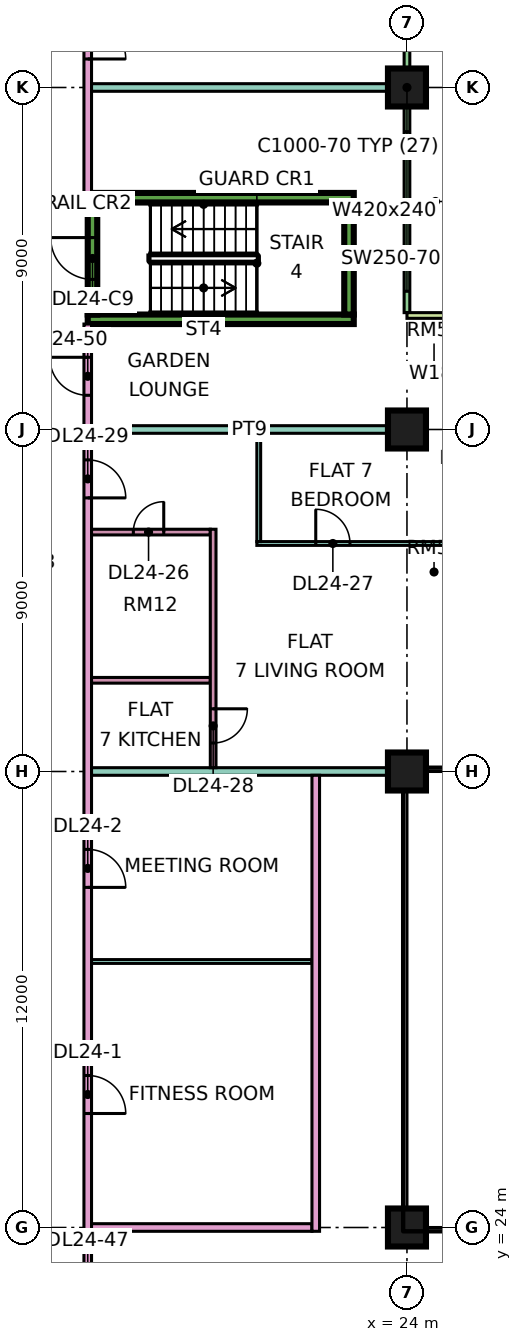
"""IFC4 building model, lengths in metres.
Left out: names, types, materials, properties, quantities, classifications, styles, units other than length and angle.
Written with IfcOpenShell. Run it as: python <this file> out.ifc"""

import sys

from ifc_helpers import new_model, si_unit, direction, frame, frame_2d, origin, origin_2d, place, context, subcontext, project, spatial, rectangle, extrude, element, fill, save


model = new_model("IFC4")
c1 = context("Model", 3, precision=1e-05, world=origin(), true_north=direction((0.0, 1.0)))
c2 = subcontext(c1, "Body", "Model", "MODEL_VIEW")
j1 = project(units=[si_unit("LENGTHUNIT", "METRE"), si_unit("PLANEANGLEUNIT", "RADIAN")], contexts=[c1])
p1 = place(None, origin())
s1 = spatial("IfcSite", under=j1, at=p1, CompositionType="ELEMENT")
p2 = place(p1, origin())
s2 = spatial("IfcBuilding", under=s1, at=p2, CompositionType="ELEMENT")
p3 = place(p2, frame((0.0, 0.0, 106.9)))
s3 = spatial("IfcBuildingStorey", under=s2, at=p3, CompositionType="ELEMENT", Elevation=106.9)
for number, where, z_axis, x_axis in (
    (1, (24.0, 24.0, 0.0), (0.0, 0.0, 1.0), (1.0, 0.0, 0.0)),
    (2, (24.0, 36.0, 0.0), (0.0, 0.0, 1.0), (1.0, 0.0, 0.0)),
    (3, (24.0, 45.0, 0.0), (0.0, 0.0, 1.0), (1.0, 0.0, 0.0)),
    (4, (24.0, 54.0, 0.0), (0.0, 0.0, 1.0), (1.0, 0.0, 0.0)),
):
    element("IfcColumn", number, at=place(p3, frame(where, z_axis=z_axis, x_axis=x_axis)), inside=s3, PredefinedType="COLUMN", context=c2, shape_type="SweptSolid", body=[
        extrude(rectangle(XDim=1.0, YDim=1.0, at=origin_2d()), origin(), (0.0, 0.0, 1.0), 3.75),
    ])
for number, where, z_axis, x_axis in (
    (5, (15.6, 47.9, 0.0), (0.0, 0.0, 1.0), (1.0, 0.0, 0.0)),
    (6, (15.6, 51.1, 0.0), (0.0, 0.0, 1.0), (1.0, 0.0, 0.0)),
):
    element("IfcWall", number, at=place(p3, frame(where, z_axis=z_axis, x_axis=x_axis)), inside=s3, PredefinedType="SHEAR", context=c2, shape_type="SweptSolid", body=[
        extrude(rectangle(XDim=7.0, YDim=0.25, at=frame_2d((3.5, 0.0))), origin(), (0.0, 0.0, 1.0), 3.75),
    ])
p4 = place(p3, frame((15.725, 48.025, 0.0), z_axis=(0.0, 0.0, 1.0), x_axis=(0.0, 1.0, 0.0)))
e7 = element("IfcWall", 7, at=p4, inside=s3, PredefinedType="SHEAR", context=c2, shape_type="SweptSolid", body=[
    extrude(rectangle(XDim=2.95, YDim=0.25, at=frame_2d((1.475, 0.0))), origin(), (0.0, 0.0, 1.0), 3.75),
])
p5 = place(p4, frame((0.925, 0.0, 0.0)))
e8 = element("IfcOpeningElement", 8, at=p5, cuts=e7, PredefinedType="OPENING", context=c2, shape_type="SweptSolid", body=[
    extrude(rectangle(XDim=1.1, YDim=2.2, at=frame_2d((0.55, 1.1))), frame((0.0, 0.135, 0.0), z_axis=(0.0, -1.0, 0.0), x_axis=(1.0, 0.0, 0.0)), (0.0, 0.0, 1.0), 0.27),
])
p6 = place(p3, frame((22.475, 48.025, 0.0), z_axis=(0.0, 0.0, 1.0), x_axis=(0.0, 1.0, 0.0)))
e9 = element("IfcWall", 9, at=p6, inside=s3, PredefinedType="SHEAR", context=c2, shape_type="SweptSolid", body=[
    extrude(rectangle(XDim=2.95, YDim=0.25, at=frame_2d((1.475, 0.0))), origin(), (0.0, 0.0, 1.0), 3.75),
])
p7 = place(p3, frame((24.0, 48.075, 0.0), z_axis=(0.0, 0.0, 1.0), x_axis=(0.0, 1.0, 0.0)))
e10 = element("IfcWall", 10, at=p7, inside=s3, PredefinedType="SOLIDWALL", context=c2, shape_type="SweptSolid", body=[
    extrude(rectangle(XDim=13.35, YDim=0.15, at=frame_2d((6.675, 0.0))), origin(), (0.0, 0.0, 1.0), 3.35),
])
p8 = place(p7, frame((0.562, 0.0, 0.45)))
e11 = element("IfcOpeningElement", 11, at=p8, cuts=e10, PredefinedType="OPENING", context=c2, shape_type="SweptSolid", body=[
    extrude(rectangle(XDim=4.2, YDim=2.4, at=frame_2d((2.1, 1.2))), frame((0.0, 0.085, 0.0), z_axis=(0.0, -1.0, 0.0), x_axis=(1.0, 0.0, 0.0)), (0.0, 0.0, 1.0), 0.17),
])
p9 = place(p7, frame((8.325, 0.0, 0.0)))
e12 = element("IfcOpeningElement", 12, at=p9, cuts=e10, PredefinedType="OPENING", context=c2, shape_type="SweptSolid", body=[
    extrude(rectangle(XDim=1.8, YDim=2.4, at=frame_2d((0.9, 1.2))), frame((0.0, 0.085, 0.0), z_axis=(0.0, -1.0, 0.0), x_axis=(1.0, 0.0, 0.0)), (0.0, 0.0, 1.0), 0.17),
])
p10 = place(p7, frame((12.188, 0.0, 0.45)))
e13 = element("IfcOpeningElement", 13, at=p10, cuts=e10, PredefinedType="OPENING", context=c2, shape_type="SweptSolid", body=[
    extrude(rectangle(XDim=0.9, YDim=2.4, at=frame_2d((0.45, 1.2))), frame((0.0, 0.085, 0.0), z_axis=(0.0, -1.0, 0.0), x_axis=(1.0, 0.0, 0.0)), (0.0, 0.0, 1.0), 0.17),
])
p11 = place(p3, frame((25.5, 48.0, 0.0), z_axis=(0.0, 0.0, 1.0), x_axis=(-1.0, 0.0, 0.0)))
e14 = element("IfcWall", 14, at=p11, inside=s3, PredefinedType="SOLIDWALL", context=c2, shape_type="SweptSolid", body=[
    extrude(rectangle(XDim=1.5, YDim=0.15, at=frame_2d((0.75, 0.0))), origin(), (0.0, 0.0, 1.0), 3.35),
])
p12 = place(p3, frame((15.6, 20.0, 0.0), z_axis=(0.0, 0.0, 1.0), x_axis=(0.0, 1.0, 0.0)))
e15 = element("IfcWall", 15, at=p12, inside=s3, PredefinedType="PARTITIONING", context=c2, shape_type="SweptSolid", body=[
    extrude(rectangle(XDim=27.775, YDim=0.2, at=frame_2d((13.887, 0.0))), origin(), (0.0, 0.0, 1.0), 3.35),
])
p13 = place(p12, frame((7.0, 0.0, 0.0)))
e16 = element("IfcOpeningElement", 16, at=p13, cuts=e15, PredefinedType="OPENING", context=c2, shape_type="SweptSolid", body=[
    extrude(rectangle(XDim=1.0, YDim=2.1, at=frame_2d((0.5, 1.05))), frame((0.0, 0.11, 0.0), z_axis=(0.0, -1.0, 0.0), x_axis=(1.0, 0.0, 0.0)), (0.0, 0.0, 1.0), 0.22),
])
p14 = place(p12, frame((12.95, 0.0, 0.0)))
e17 = element("IfcOpeningElement", 17, at=p14, cuts=e15, PredefinedType="OPENING", context=c2, shape_type="SweptSolid", body=[
    extrude(rectangle(XDim=1.0, YDim=2.1, at=frame_2d((0.5, 1.05))), frame((0.0, 0.11, 0.0), z_axis=(0.0, -1.0, 0.0), x_axis=(1.0, 0.0, 0.0)), (0.0, 0.0, 1.0), 0.22),
])
p15 = place(p12, frame((23.2, 0.0, 0.0)))
e18 = element("IfcOpeningElement", 18, at=p15, cuts=e15, PredefinedType="OPENING", context=c2, shape_type="SweptSolid", body=[
    extrude(rectangle(XDim=1.0, YDim=2.1, at=frame_2d((0.5, 1.05))), frame((0.0, 0.11, 0.0), z_axis=(0.0, -1.0, 0.0), x_axis=(1.0, 0.0, 0.0)), (0.0, 0.0, 1.0), 0.22),
])
p16 = place(p12, frame((1.15, 0.0, 0.0)))
e19 = element("IfcOpeningElement", 19, at=p16, cuts=e15, PredefinedType="OPENING", context=c2, shape_type="SweptSolid", body=[
    extrude(rectangle(XDim=1.8, YDim=2.1, at=frame_2d((0.9, 1.05))), frame((0.0, 0.11, 0.0), z_axis=(0.0, -1.0, 0.0), x_axis=(1.0, 0.0, 0.0)), (0.0, 0.0, 1.0), 0.22),
])
p17 = place(p12, frame((25.9, 0.0, 0.0)))
e20 = element("IfcOpeningElement", 20, at=p17, cuts=e15, PredefinedType="OPENING", context=c2, shape_type="SweptSolid", body=[
    extrude(rectangle(XDim=1.0, YDim=2.1, at=frame_2d((0.5, 1.05))), frame((0.0, 0.11, 0.0), z_axis=(0.0, -1.0, 0.0), x_axis=(1.0, 0.0, 0.0)), (0.0, 0.0, 1.0), 0.22),
])
p18 = place(p3, frame((15.6, 51.225, 0.0), z_axis=(0.0, 0.0, 1.0), x_axis=(0.0, 1.0, 0.0)))
e21 = element("IfcWall", 21, at=p18, inside=s3, PredefinedType="PARTITIONING", context=c2, shape_type="SweptSolid", body=[
    extrude(rectangle(XDim=13.125, YDim=0.2, at=frame_2d((6.562, 0.0))), origin(), (0.0, 0.0, 1.0), 3.35),
])
p19 = place(p18, frame((3.525, 0.0, 0.0)))
e22 = element("IfcOpeningElement", 22, at=p19, cuts=e21, PredefinedType="OPENING", context=c2, shape_type="SweptSolid", body=[
    extrude(rectangle(XDim=1.0, YDim=2.1, at=frame_2d((0.5, 1.05))), frame((0.0, 0.11, 0.0), z_axis=(0.0, -1.0, 0.0), x_axis=(1.0, 0.0, 0.0)), (0.0, 0.0, 1.0), 0.22),
])
p20 = place(p3, frame((15.7, 24.0, 0.0), z_axis=(0.0, 0.0, 1.0), x_axis=(1.0, 0.0, 0.0)))
e23 = element("IfcWall", 23, at=p20, inside=s3, PredefinedType="PARTITIONING", context=c2, shape_type="SweptSolid", body=[
    extrude(rectangle(XDim=5.8, YDim=0.2, at=frame_2d((2.9, 0.0))), origin(), (0.0, 0.0, 1.0), 3.35),
])
p21 = place(p3, frame((15.7, 31.0, 0.0), z_axis=(0.0, 0.0, 1.0), x_axis=(1.0, 0.0, 0.0)))
e24 = element("IfcWall", 24, at=p21, inside=s3, PredefinedType="PARTITIONING", context=c2, shape_type="SweptSolid", body=[
    extrude(rectangle(XDim=5.8, YDim=0.1, at=frame_2d((2.9, 0.0))), origin(), (0.0, 0.0, 1.0), 3.35),
])
p22 = place(p3, frame((15.7, 36.0, 0.0), z_axis=(0.0, 0.0, 1.0), x_axis=(1.0, 0.0, 0.0)))
e25 = element("IfcWall", 25, at=p22, inside=s3, PredefinedType="PARTITIONING", context=c2, shape_type="SweptSolid", body=[
    extrude(rectangle(XDim=8.3, YDim=0.2, at=frame_2d((4.15, 0.0))), origin(), (0.0, 0.0, 1.0), 3.35),
])
p23 = place(p3, frame((15.7, 38.4, 0.0), z_axis=(0.0, 0.0, 1.0), x_axis=(1.0, 0.0, 0.0)))
e26 = element("IfcWall", 26, at=p23, inside=s3, PredefinedType="PARTITIONING", context=c2, shape_type="SweptSolid", body=[
    extrude(rectangle(XDim=3.125, YDim=0.15, at=frame_2d((1.562, 0.0))), origin(), (0.0, 0.0, 1.0), 3.35),
])
p24 = place(p3, frame((15.7, 42.3, 0.0), z_axis=(0.0, 0.0, 1.0), x_axis=(1.0, 0.0, 0.0)))
e27 = element("IfcWall", 27, at=p24, inside=s3, PredefinedType="PARTITIONING", context=c2, shape_type="SweptSolid", body=[
    extrude(rectangle(XDim=3.125, YDim=0.15, at=frame_2d((1.562, 0.0))), origin(), (0.0, 0.0, 1.0), 3.35),
])
p25 = place(p24, frame((1.1, 0.0, 0.0)))
e28 = element("IfcOpeningElement", 28, at=p25, cuts=e27, PredefinedType="OPENING", context=c2, shape_type="SweptSolid", body=[
    extrude(rectangle(XDim=0.8, YDim=2.1, at=frame_2d((0.4, 1.05))), frame((0.0, 0.085, 0.0), z_axis=(0.0, -1.0, 0.0), x_axis=(1.0, 0.0, 0.0)), (0.0, 0.0, 1.0), 0.17),
])
p26 = place(p3, frame((15.7, 45.0, 0.0), z_axis=(0.0, 0.0, 1.0), x_axis=(1.0, 0.0, 0.0)))
e29 = element("IfcWall", 29, at=p26, inside=s3, PredefinedType="PARTITIONING", context=c2, shape_type="SweptSolid", body=[
    extrude(rectangle(XDim=8.3, YDim=0.2, at=frame_2d((4.15, 0.0))), origin(), (0.0, 0.0, 1.0), 3.35),
])
p27 = place(p3, frame((15.7, 54.0, 0.0), z_axis=(0.0, 0.0, 1.0), x_axis=(1.0, 0.0, 0.0)))
e30 = element("IfcWall", 30, at=p27, inside=s3, PredefinedType="PARTITIONING", context=c2, shape_type="SweptSolid", body=[
    extrude(rectangle(XDim=8.226, YDim=0.2, at=frame_2d((4.113, 0.0))), origin(), (0.0, 0.0, 1.0), 3.35),
])
p28 = place(p3, frame((18.9, 36.1, 0.0), z_axis=(0.0, 0.0, 1.0), x_axis=(0.0, 1.0, 0.0)))
e31 = element("IfcWall", 31, at=p28, inside=s3, PredefinedType="PARTITIONING", context=c2, shape_type="SweptSolid", body=[
    extrude(rectangle(XDim=6.275, YDim=0.15, at=frame_2d((3.137, 0.0))), origin(), (0.0, 0.0, 1.0), 3.35),
])
p29 = place(p28, frame((0.65, 0.0, 0.0)))
e32 = element("IfcOpeningElement", 32, at=p29, cuts=e31, PredefinedType="OPENING", context=c2, shape_type="SweptSolid", body=[
    extrude(rectangle(XDim=0.9, YDim=2.1, at=frame_2d((0.45, 1.05))), frame((0.0, 0.085, 0.0), z_axis=(0.0, -1.0, 0.0), x_axis=(1.0, 0.0, 0.0)), (0.0, 0.0, 1.0), 0.17),
])
p30 = place(p3, frame((20.05, 42.0, 0.0), z_axis=(0.0, 0.0, 1.0), x_axis=(1.0, 0.0, 0.0)))
e33 = element("IfcWall", 33, at=p30, inside=s3, PredefinedType="PARTITIONING", context=c2, shape_type="SweptSolid", body=[
    extrude(rectangle(XDim=5.3, YDim=0.1, at=frame_2d((2.65, 0.0))), origin(), (0.0, 0.0, 1.0), 3.35),
])
p31 = place(p30, frame((1.55, 0.0, 0.0)))
e34 = element("IfcOpeningElement", 34, at=p31, cuts=e33, PredefinedType="OPENING", context=c2, shape_type="SweptSolid", body=[
    extrude(rectangle(XDim=0.9, YDim=2.1, at=frame_2d((0.45, 1.05))), frame((0.0, 0.06, 0.0), z_axis=(0.0, -1.0, 0.0), x_axis=(1.0, 0.0, 0.0)), (0.0, 0.0, 1.0), 0.12),
])
p32 = place(p3, frame((20.1, 42.05, 0.0), z_axis=(0.0, 0.0, 1.0), x_axis=(0.0, 1.0, 0.0)))
e35 = element("IfcWall", 35, at=p32, inside=s3, PredefinedType="PARTITIONING", context=c2, shape_type="SweptSolid", body=[
    extrude(rectangle(XDim=2.85, YDim=0.1, at=frame_2d((1.425, 0.0))), origin(), (0.0, 0.0, 1.0), 3.35),
])
p33 = place(p3, frame((21.6, 23.9, 0.0), z_axis=(0.0, 0.0, 1.0), x_axis=(0.0, 1.0, 0.0)))
e36 = element("IfcWall", 36, at=p33, inside=s3, PredefinedType="PARTITIONING", context=c2, shape_type="SweptSolid", body=[
    extrude(rectangle(XDim=12.0, YDim=0.2, at=frame_2d((6.0, 0.0))), origin(), (0.0, 0.0, 1.0), 3.35),
])
p34 = place(p8, origin())
e37 = element("IfcWindow", 37, at=p34, inside=s3, PartitioningType="SINGLE_PANEL", PredefinedType="WINDOW", context=c2, shape_type="SweptSolid", body=[
    extrude(rectangle(XDim=4.2, YDim=2.4, at=frame_2d((2.1, 1.2))), frame((0.0, 0.03, 0.0), z_axis=(0.0, -1.0, 0.0), x_axis=(1.0, 0.0, 0.0)), (0.0, 0.0, 1.0), 0.06),
])
fill(e11, e37)
p35 = place(p5, frame((1.1, 0.0, 0.0), z_axis=(0.0, 0.0, 1.0), x_axis=(-1.0, 0.0, 0.0)))
e38 = element("IfcDoor", 38, at=p35, inside=s3, OperationType="SINGLE_SWING_RIGHT", PredefinedType="DOOR", context=c2, shape_type="SweptSolid", body=[
    extrude(rectangle(XDim=1.1, YDim=2.2, at=frame_2d((0.55, 1.1))), frame((0.0, 0.025, 0.0), z_axis=(0.0, -1.0, 0.0), x_axis=(1.0, 0.0, 0.0)), (0.0, 0.0, 1.0), 0.05),
])
fill(e8, e38)
p36 = place(p13, frame((1.0, 0.0, 0.0), z_axis=(0.0, 0.0, 1.0), x_axis=(-1.0, 0.0, 0.0)))
e39 = element("IfcDoor", 39, at=p36, inside=s3, OperationType="SINGLE_SWING_LEFT", PredefinedType="DOOR", context=c2, shape_type="SweptSolid", body=[
    extrude(rectangle(XDim=1.0, YDim=2.1, at=frame_2d((0.5, 1.05))), frame((0.0, 0.025, 0.0), z_axis=(0.0, -1.0, 0.0), x_axis=(1.0, 0.0, 0.0)), (0.0, 0.0, 1.0), 0.05),
])
fill(e16, e39)
p37 = place(p14, frame((1.0, 0.0, 0.0), z_axis=(0.0, 0.0, 1.0), x_axis=(-1.0, 0.0, 0.0)))
e40 = element("IfcDoor", 40, at=p37, inside=s3, OperationType="SINGLE_SWING_LEFT", PredefinedType="DOOR", context=c2, shape_type="SweptSolid", body=[
    extrude(rectangle(XDim=1.0, YDim=2.1, at=frame_2d((0.5, 1.05))), frame((0.0, 0.025, 0.0), z_axis=(0.0, -1.0, 0.0), x_axis=(1.0, 0.0, 0.0)), (0.0, 0.0, 1.0), 0.05),
])
fill(e17, e40)
p38 = place(p25, frame((0.8, 0.0, 0.0), z_axis=(0.0, 0.0, 1.0), x_axis=(-1.0, 0.0, 0.0)))
e41 = element("IfcDoor", 41, at=p38, inside=s3, OperationType="SINGLE_SWING_RIGHT", PredefinedType="DOOR", context=c2, shape_type="SweptSolid", body=[
    extrude(rectangle(XDim=0.8, YDim=2.1, at=frame_2d((0.4, 1.05))), frame((0.0, 0.025, 0.0), z_axis=(0.0, -1.0, 0.0), x_axis=(1.0, 0.0, 0.0)), (0.0, 0.0, 1.0), 0.05),
])
fill(e28, e41)
p39 = place(p31, origin())
e42 = element("IfcDoor", 42, at=p39, inside=s3, OperationType="SINGLE_SWING_LEFT", PredefinedType="DOOR", context=c2, shape_type="SweptSolid", body=[
    extrude(rectangle(XDim=0.9, YDim=2.1, at=frame_2d((0.45, 1.05))), frame((0.0, 0.025, 0.0), z_axis=(0.0, -1.0, 0.0), x_axis=(1.0, 0.0, 0.0)), (0.0, 0.0, 1.0), 0.05),
])
fill(e34, e42)
p40 = place(p29, origin())
e43 = element("IfcDoor", 43, at=p40, inside=s3, OperationType="SINGLE_SWING_RIGHT", PredefinedType="DOOR", context=c2, shape_type="SweptSolid", body=[
    extrude(rectangle(XDim=0.9, YDim=2.1, at=frame_2d((0.45, 1.05))), frame((0.0, 0.025, 0.0), z_axis=(0.0, -1.0, 0.0), x_axis=(1.0, 0.0, 0.0)), (0.0, 0.0, 1.0), 0.05),
])
fill(e32, e43)
p41 = place(p15, frame((1.0, 0.0, 0.0), z_axis=(0.0, 0.0, 1.0), x_axis=(-1.0, 0.0, 0.0)))
e44 = element("IfcDoor", 44, at=p41, inside=s3, OperationType="SINGLE_SWING_LEFT", PredefinedType="DOOR", context=c2, shape_type="SweptSolid", body=[
    extrude(rectangle(XDim=1.0, YDim=2.1, at=frame_2d((0.5, 1.05))), frame((0.0, 0.025, 0.0), z_axis=(0.0, -1.0, 0.0), x_axis=(1.0, 0.0, 0.0)), (0.0, 0.0, 1.0), 0.05),
])
fill(e18, e44)
p42 = place(p19, frame((1.0, 0.0, 0.0), z_axis=(0.0, 0.0, 1.0), x_axis=(-1.0, 0.0, 0.0)))
e45 = element("IfcDoor", 45, at=p42, inside=s3, OperationType="SINGLE_SWING_LEFT", PredefinedType="DOOR", context=c2, shape_type="SweptSolid", body=[
    extrude(rectangle(XDim=1.0, YDim=2.1, at=frame_2d((0.5, 1.05))), frame((0.0, 0.025, 0.0), z_axis=(0.0, -1.0, 0.0), x_axis=(1.0, 0.0, 0.0)), (0.0, 0.0, 1.0), 0.05),
])
fill(e22, e45)
p43 = place(p17, frame((1.0, 0.0, 0.0), z_axis=(0.0, 0.0, 1.0), x_axis=(-1.0, 0.0, 0.0)))
e46 = element("IfcDoor", 46, at=p43, inside=s3, OperationType="SINGLE_SWING_RIGHT", PredefinedType="DOOR", context=c2, shape_type="SweptSolid", body=[
    extrude(rectangle(XDim=1.0, YDim=2.1, at=frame_2d((0.5, 1.05))), frame((0.0, 0.025, 0.0), z_axis=(0.0, -1.0, 0.0), x_axis=(1.0, 0.0, 0.0)), (0.0, 0.0, 1.0), 0.05),
])
fill(e20, e46)
save(model, sys.argv[1])
